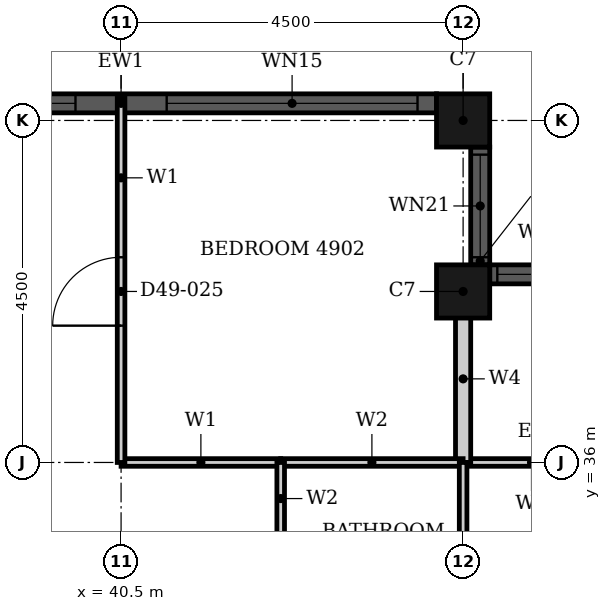
"""IFC4 building model, lengths in metres.
Left out: names, types, materials, properties, quantities, classifications, styles, units other than length and angle.
Written with IfcOpenShell. Run it as: python <this file> out.ifc"""

import sys

from ifc_helpers import new_model, si_unit, direction, frame, frame_2d, origin, origin_2d, place, context, subcontext, project, spatial, rectangle, hollow_rectangle, extrude, element, fill, save


model = new_model("IFC4")
c1 = context("Model", 3, precision=1e-05, world=origin(), true_north=direction((0.0, 1.0)))
c2 = subcontext(c1, "Body", "Model", "MODEL_VIEW")
j1 = project(units=[si_unit("LENGTHUNIT", "METRE"), si_unit("PLANEANGLEUNIT", "RADIAN")], contexts=[c1])
p1 = place(None, origin())
s1 = spatial("IfcSite", under=j1, at=p1, CompositionType="ELEMENT")
p2 = place(p1, origin())
s2 = spatial("IfcBuilding", under=s1, at=p2, CompositionType="ELEMENT")
p3 = place(p2, frame((0.0, 0.0, 196.1)))
s3 = spatial("IfcBuildingStorey", under=s2, at=p3, CompositionType="ELEMENT", Elevation=196.1)
for number, where, z_axis, x_axis in (
    (1, (45.0, 38.25, 0.0), (0.0, 0.0, 1.0), (1.0, 0.0, 0.0)),
    (2, (45.0, 40.5, 0.0), (0.0, 0.0, 1.0), (1.0, 0.0, 0.0)),
):
    element("IfcColumn", number, at=place(p3, frame(where, z_axis=z_axis, x_axis=x_axis)), inside=s3, PredefinedType="COLUMN", context=c2, shape_type="SweptSolid", body=[
        extrude(hollow_rectangle(XDim=0.7, YDim=0.7, WallThickness=0.022, at=origin_2d()), origin(), (0.0, 0.0, 1.0), 3.7),
    ])
p4 = place(p3, frame((46.9, 38.475, 0.0), z_axis=(0.0, 0.0, 1.0), x_axis=(-1.0, 0.0, 0.0)))
e3 = element("IfcWall", 3, at=p4, inside=s3, PredefinedType="SOLIDWALL", context=c2, shape_type="SweptSolid", body=[
    extrude(rectangle(XDim=1.55, YDim=0.25, at=frame_2d((0.775, 0.0))), origin(), (0.0, 0.0, 1.0), 3.7),
])
p5 = place(p4, frame((0.1, 0.0, 0.9)))
e4 = element("IfcOpeningElement", 4, at=p5, cuts=e3, PredefinedType="OPENING", context=c2, shape_type="SweptSolid", body=[
    extrude(rectangle(XDim=1.35, YDim=1.85, at=frame_2d((0.675, 0.925))), frame((0.0, 0.135, 0.0), z_axis=(0.0, -1.0, 0.0), x_axis=(1.0, 0.0, 0.0)), (0.0, 0.0, 1.0), 0.27),
])
p6 = place(p3, frame((45.225, 38.6, 0.0), z_axis=(0.0, 0.0, 1.0), x_axis=(0.0, 1.0, 0.0)))
e5 = element("IfcWall", 5, at=p6, inside=s3, PredefinedType="SOLIDWALL", context=c2, shape_type="SweptSolid", body=[
    extrude(rectangle(XDim=1.55, YDim=0.25, at=frame_2d((0.775, 0.0))), origin(), (0.0, 0.0, 1.0), 3.7),
])
p7 = place(p6, frame((0.1, 0.0, 0.9)))
e6 = element("IfcOpeningElement", 6, at=p7, cuts=e5, PredefinedType="OPENING", context=c2, shape_type="SweptSolid", body=[
    extrude(rectangle(XDim=1.35, YDim=1.85, at=frame_2d((0.675, 0.925))), frame((0.0, 0.135, 0.0), z_axis=(0.0, -1.0, 0.0), x_axis=(1.0, 0.0, 0.0)), (0.0, 0.0, 1.0), 0.27),
])
p8 = place(p3, frame((44.65, 40.725, 0.0), z_axis=(0.0, 0.0, 1.0), x_axis=(-1.0, 0.0, 0.0)))
e7 = element("IfcWall", 7, at=p8, inside=s3, PredefinedType="SOLIDWALL", context=c2, shape_type="SweptSolid", body=[
    extrude(rectangle(XDim=8.3, YDim=0.25, at=frame_2d((4.15, 0.0))), origin(), (0.0, 0.0, 1.0), 3.7),
])
p9 = place(p8, frame((0.25, 0.0, 0.45)))
e8 = element("IfcOpeningElement", 8, at=p9, cuts=e7, PredefinedType="OPENING", context=c2, shape_type="SweptSolid", body=[
    extrude(rectangle(XDim=3.3, YDim=2.3, at=frame_2d((1.65, 1.15))), frame((0.0, 0.135, 0.0), z_axis=(0.0, -1.0, 0.0), x_axis=(1.0, 0.0, 0.0)), (0.0, 0.0, 1.0), 0.27),
])
p10 = place(p8, frame((4.75, 0.0, 0.45)))
e9 = element("IfcOpeningElement", 9, at=p10, cuts=e7, PredefinedType="OPENING", context=c2, shape_type="SweptSolid", body=[
    extrude(rectangle(XDim=3.3, YDim=2.3, at=frame_2d((1.65, 1.15))), frame((0.0, 0.135, 0.0), z_axis=(0.0, -1.0, 0.0), x_axis=(1.0, 0.0, 0.0)), (0.0, 0.0, 1.0), 0.27),
])
p11 = place(p3, frame((40.5, 36.0, 0.0), z_axis=(0.0, 0.0, 1.0), x_axis=(1.0, 0.0, 0.0)))
e10 = element("IfcWall", 10, at=p11, inside=s3, PredefinedType="PARTITIONING", context=c2, shape_type="SweptSolid", body=[
    extrude(rectangle(XDim=2.1, YDim=0.1, at=frame_2d((1.05, 0.0))), origin(), (0.0, 0.0, 1.0), 3.4),
])
p12 = place(p3, frame((45.0, 36.0, 0.0), z_axis=(0.0, 0.0, 1.0), x_axis=(1.0, 0.0, 0.0)))
e11 = element("IfcWall", 11, at=p12, inside=s3, PredefinedType="PARTITIONING", context=c2, shape_type="SweptSolid", body=[
    extrude(rectangle(XDim=1.8, YDim=0.1, at=frame_2d((0.9, 0.0))), origin(), (0.0, 0.0, 1.0), 3.4),
])
p13 = place(p3, frame((40.5, 36.0, 0.0), z_axis=(0.0, 0.0, 1.0), x_axis=(0.0, 1.0, 0.0)))
e12 = element("IfcWall", 12, at=p13, inside=s3, PredefinedType="PARTITIONING", context=c2, shape_type="SweptSolid", body=[
    extrude(rectangle(XDim=4.79, YDim=0.1, at=frame_2d((2.395, 0.0))), origin(), (0.0, 0.0, 1.0), 3.4),
])
p14 = place(p13, frame((1.8, 0.0, 0.0)))
e13 = element("IfcOpeningElement", 13, at=p14, cuts=e12, PredefinedType="OPENING", context=c2, shape_type="SweptSolid", body=[
    extrude(rectangle(XDim=0.9, YDim=2.1, at=frame_2d((0.45, 1.05))), frame((0.0, 0.06, 0.0), z_axis=(0.0, -1.0, 0.0), x_axis=(1.0, 0.0, 0.0)), (0.0, 0.0, 1.0), 0.12),
])
p15 = place(p3, frame((45.0, 36.0, 0.0), z_axis=(0.0, 0.0, 1.0), x_axis=(0.0, 1.0, 0.0)))
e14 = element("IfcWall", 14, at=p15, inside=s3, PredefinedType="PARTITIONING", context=c2, shape_type="SweptSolid", body=[
    extrude(rectangle(XDim=2.2, YDim=0.2, at=frame_2d((1.1, 0.0))), origin(), (0.0, 0.0, 1.0), 3.4),
])
p16 = place(p3, frame((42.6, 36.0, 0.0), z_axis=(0.0, 0.0, 1.0), x_axis=(1.0, 0.0, 0.0)))
e15 = element("IfcWall", 15, at=p16, inside=s3, PredefinedType="PARTITIONING", context=c2, shape_type="SweptSolid", body=[
    extrude(rectangle(XDim=2.4, YDim=0.1, at=frame_2d((1.2, 0.0))), origin(), (0.0, 0.0, 1.0), 3.4),
])
p17 = place(p3, frame((42.6, 33.3, 0.0), z_axis=(0.0, 0.0, 1.0), x_axis=(0.0, 1.0, 0.0)))
e16 = element("IfcWall", 16, at=p17, inside=s3, PredefinedType="PARTITIONING", context=c2, shape_type="SweptSolid", body=[
    extrude(rectangle(XDim=2.7, YDim=0.1, at=frame_2d((1.35, 0.0))), origin(), (0.0, 0.0, 1.0), 3.4),
])
p18 = place(p17, frame((0.95, 0.0, 0.0)))
e17 = element("IfcOpeningElement", 17, at=p18, cuts=e16, PredefinedType="OPENING", context=c2, shape_type="SweptSolid", body=[
    extrude(rectangle(XDim=0.8, YDim=2.1, at=frame_2d((0.4, 1.05))), frame((0.0, 0.06, 0.0), z_axis=(0.0, -1.0, 0.0), x_axis=(1.0, 0.0, 0.0)), (0.0, 0.0, 1.0), 0.12),
])
p19 = place(p3, frame((45.0, 33.3, 0.0), z_axis=(0.0, 0.0, 1.0), x_axis=(0.0, 1.0, 0.0)))
e18 = element("IfcWall", 18, at=p19, inside=s3, PredefinedType="PARTITIONING", context=c2, shape_type="SweptSolid", body=[
    extrude(rectangle(XDim=2.7, YDim=0.1, at=frame_2d((1.35, 0.0))), origin(), (0.0, 0.0, 1.0), 3.4),
])
p20 = place(p5, origin())
e19 = element("IfcWindow", 19, at=p20, inside=s3, PartitioningType="SINGLE_PANEL", PredefinedType="WINDOW", context=c2, shape_type="SweptSolid", body=[
    extrude(rectangle(XDim=1.35, YDim=1.85, at=frame_2d((0.675, 0.925))), frame((0.0, 0.03, 0.0), z_axis=(0.0, -1.0, 0.0), x_axis=(1.0, 0.0, 0.0)), (0.0, 0.0, 1.0), 0.06),
])
fill(e4, e19)
p21 = place(p7, origin())
e20 = element("IfcWindow", 20, at=p21, inside=s3, PartitioningType="SINGLE_PANEL", PredefinedType="WINDOW", context=c2, shape_type="SweptSolid", body=[
    extrude(rectangle(XDim=1.35, YDim=1.85, at=frame_2d((0.675, 0.925))), frame((0.0, 0.03, 0.0), z_axis=(0.0, -1.0, 0.0), x_axis=(1.0, 0.0, 0.0)), (0.0, 0.0, 1.0), 0.06),
])
fill(e6, e20)
p22 = place(p9, origin())
e21 = element("IfcWindow", 21, at=p22, inside=s3, PartitioningType="SINGLE_PANEL", PredefinedType="WINDOW", context=c2, shape_type="SweptSolid", body=[
    extrude(rectangle(XDim=3.3, YDim=2.3, at=frame_2d((1.65, 1.15))), frame((0.0, 0.03, 0.0), z_axis=(0.0, -1.0, 0.0), x_axis=(1.0, 0.0, 0.0)), (0.0, 0.0, 1.0), 0.06),
])
fill(e8, e21)
p23 = place(p10, origin())
e22 = element("IfcWindow", 22, at=p23, inside=s3, PartitioningType="SINGLE_PANEL", PredefinedType="WINDOW", context=c2, shape_type="SweptSolid", body=[
    extrude(rectangle(XDim=3.3, YDim=2.3, at=frame_2d((1.65, 1.15))), frame((0.0, 0.03, 0.0), z_axis=(0.0, -1.0, 0.0), x_axis=(1.0, 0.0, 0.0)), (0.0, 0.0, 1.0), 0.06),
])
fill(e9, e22)
p24 = place(p14, origin())
e23 = element("IfcDoor", 23, at=p24, inside=s3, OperationType="SINGLE_SWING_RIGHT", PredefinedType="DOOR", context=c2, shape_type="SweptSolid", body=[
    extrude(rectangle(XDim=0.9, YDim=2.1, at=frame_2d((0.45, 1.05))), frame((0.0, 0.025, 0.0), z_axis=(0.0, -1.0, 0.0), x_axis=(1.0, 0.0, 0.0)), (0.0, 0.0, 1.0), 0.05),
])
fill(e13, e23)
save(model, sys.argv[1])
